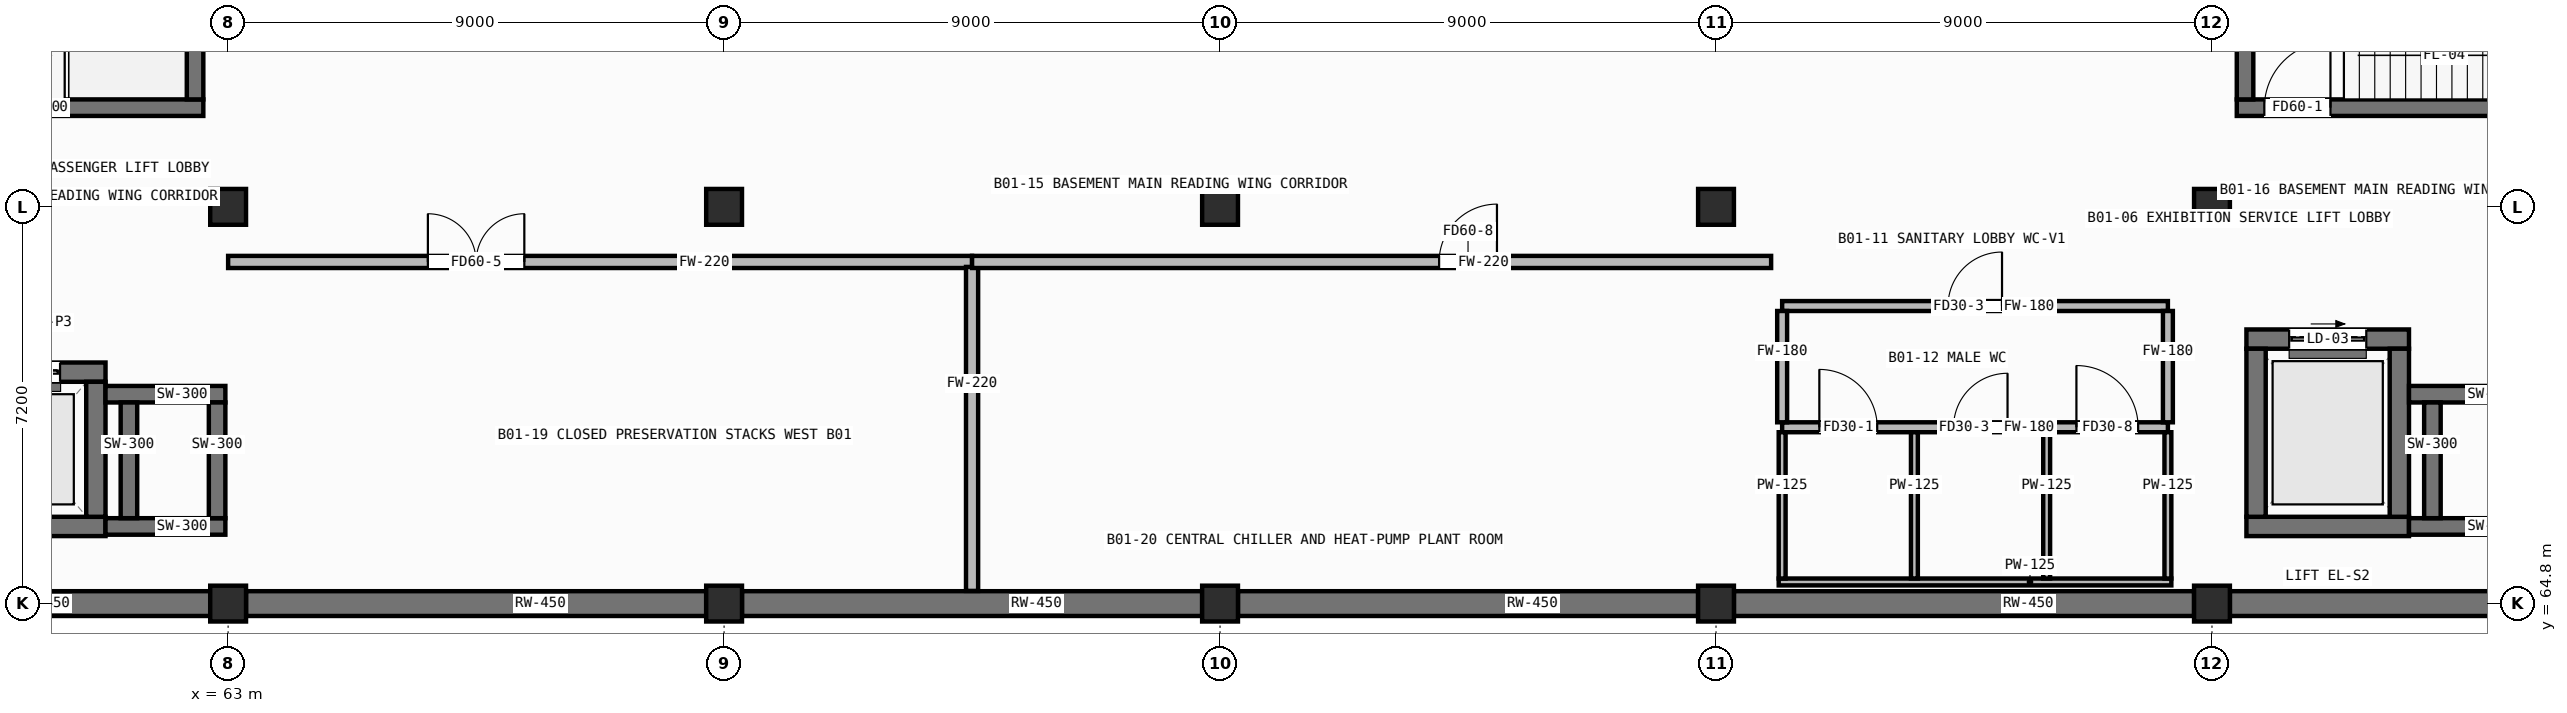
"""IFC4 building model, lengths in metres.
Left out: names, types, materials, properties, quantities, classifications, styles, units other than length and angle.
Written with IfcOpenShell. Run it as: python <this file> out.ifc"""

import sys

from ifc_helpers import new_model, si_unit, direction, frame, frame_2d, origin, origin_2d, place, context, subcontext, project, spatial, rectangle, hollow_rectangle, extrude, element, fill, save


model = new_model("IFC4")
c1 = context("Model", 3, precision=1e-05, world=origin(), true_north=direction((0.0, 1.0)))
c2 = subcontext(c1, "Body", "Model", "MODEL_VIEW")
j1 = project(units=[si_unit("LENGTHUNIT", "METRE"), si_unit("PLANEANGLEUNIT", "RADIAN")], contexts=[c1])
p1 = place(None, origin())
s1 = spatial("IfcSite", under=j1, at=p1, CompositionType="ELEMENT")
p2 = place(p1, origin())
s2 = spatial("IfcBuilding", under=s1, at=p2, CompositionType="ELEMENT")
p3 = place(p2, frame((0.0, 0.0, -4.9)))
s3 = spatial("IfcBuildingStorey", under=s2, at=p3, CompositionType="ELEMENT", Elevation=-4.9)
for number, where, z_axis, x_axis in (
    (1, (63.0, 64.8, 0.0), (0.0, 0.0, 1.0), (1.0, 0.0, 0.0)),
    (2, (63.0, 72.0, 0.0), (0.0, 0.0, 1.0), (1.0, 0.0, 0.0)),
    (3, (72.0, 64.8, 0.0), (0.0, 0.0, 1.0), (1.0, 0.0, 0.0)),
    (4, (72.0, 72.0, 0.0), (0.0, 0.0, 1.0), (1.0, 0.0, 0.0)),
    (5, (81.0, 64.8, 0.0), (0.0, 0.0, 1.0), (1.0, 0.0, 0.0)),
    (6, (81.0, 72.0, 0.0), (0.0, 0.0, 1.0), (1.0, 0.0, 0.0)),
    (7, (90.0, 64.8, 0.0), (0.0, 0.0, 1.0), (1.0, 0.0, 0.0)),
    (8, (90.0, 72.0, 0.0), (0.0, 0.0, 1.0), (1.0, 0.0, 0.0)),
    (9, (99.0, 64.8, 0.0), (0.0, 0.0, 1.0), (1.0, 0.0, 0.0)),
    (10, (99.0, 72.0, 0.0), (0.0, 0.0, 1.0), (1.0, 0.0, 0.0)),
):
    element("IfcColumn", number, at=place(p3, frame(where, z_axis=z_axis, x_axis=x_axis)), inside=s3, PredefinedType="COLUMN", context=c2, shape_type="SweptSolid", body=[
        extrude(hollow_rectangle(XDim=0.65, YDim=0.65, WallThickness=0.025, at=origin_2d()), origin(), (0.0, 0.0, 1.0), 4.9),
    ])
for number, where, z_axis, x_axis in (
    (11, (54.325, 64.8, 0.0), (0.0, 0.0, 1.0), (1.0, 0.0, 0.0)),
    (12, (63.325, 64.8, 0.0), (0.0, 0.0, 1.0), (1.0, 0.0, 0.0)),
    (13, (72.325, 64.8, 0.0), (0.0, 0.0, 1.0), (1.0, 0.0, 0.0)),
    (14, (81.325, 64.8, 0.0), (0.0, 0.0, 1.0), (1.0, 0.0, 0.0)),
    (15, (90.325, 64.8, 0.0), (0.0, 0.0, 1.0), (1.0, 0.0, 0.0)),
):
    element("IfcWall", number, at=place(p3, frame(where, z_axis=z_axis, x_axis=x_axis)), inside=s3, PredefinedType="SOLIDWALL", context=c2, shape_type="SweptSolid", body=[
        extrude(rectangle(XDim=8.35, YDim=0.45, at=frame_2d((4.175, 0.0))), origin(), (0.0, 0.0, 1.0), 4.125),
    ])
p4 = place(p3, frame((99.325, 64.8, 0.0), z_axis=(0.0, 0.0, 1.0), x_axis=(1.0, 0.0, 0.0)))
e16 = element("IfcWall", 16, at=p4, inside=s3, PredefinedType="SOLIDWALL", context=c2, shape_type="SweptSolid", body=[
    extrude(rectangle(XDim=8.425, YDim=0.45, at=frame_2d((4.212, 0.0))), origin(), (0.0, 0.0, 1.0), 3.975),
])
p5 = place(p3, frame((54.45, 73.8, 0.0), z_axis=(0.0, 0.0, 1.0), x_axis=(1.0, 0.0, 0.0)))
e17 = element("IfcWall", 17, at=p5, inside=s3, PredefinedType="SHEAR", context=c2, shape_type="SweptSolid", body=[
    extrude(rectangle(XDim=8.1, YDim=0.3, at=frame_2d((4.05, 0.0))), origin(), (0.0, 0.0, 1.0), 4.625),
])
p6 = place(p5, frame((0.5, 0.0, 0.0)))
e18 = element("IfcOpeningElement", 18, at=p6, cuts=e17, PredefinedType="OPENING", context=c2, shape_type="SweptSolid", body=[
    extrude(rectangle(XDim=1.2, YDim=2.1, at=frame_2d((0.6, 1.05))), frame((0.0, 0.162, 0.0), z_axis=(0.0, -1.0, 0.0), x_axis=(1.0, 0.0, 0.0)), (0.0, 0.0, 1.0), 0.324),
])
p7 = place(p3, frame((62.4, 73.95, 0.0), z_axis=(0.0, 0.0, 1.0), x_axis=(0.0, 1.0, 0.0)))
e19 = element("IfcWall", 19, at=p7, inside=s3, PredefinedType="SHEAR", context=c2, shape_type="SweptSolid", body=[
    extrude(rectangle(XDim=3.8, YDim=0.3, at=frame_2d((1.9, 0.0))), origin(), (0.0, 0.0, 1.0), 4.625),
])
p8 = place(p3, frame((99.45, 73.8, 0.0), z_axis=(0.0, 0.0, 1.0), x_axis=(1.0, 0.0, 0.0)))
e20 = element("IfcWall", 20, at=p8, inside=s3, PredefinedType="SHEAR", context=c2, shape_type="SweptSolid", body=[
    extrude(rectangle(XDim=8.1, YDim=0.3, at=frame_2d((4.05, 0.0))), origin(), (0.0, 0.0, 1.0), 4.625),
])
p9 = place(p8, frame((0.5, 0.0, 0.0)))
e21 = element("IfcOpeningElement", 21, at=p9, cuts=e20, PredefinedType="OPENING", context=c2, shape_type="SweptSolid", body=[
    extrude(rectangle(XDim=1.2, YDim=2.1, at=frame_2d((0.6, 1.05))), frame((0.0, 0.162, 0.0), z_axis=(0.0, -1.0, 0.0), x_axis=(1.0, 0.0, 0.0)), (0.0, 0.0, 1.0), 0.324),
])
p10 = place(p3, frame((99.6, 73.95, 0.0), z_axis=(0.0, 0.0, 1.0), x_axis=(0.0, 1.0, 0.0)))
e22 = element("IfcWall", 22, at=p10, inside=s3, PredefinedType="SHEAR", context=c2, shape_type="SweptSolid", body=[
    extrude(rectangle(XDim=3.8, YDim=0.3, at=frame_2d((1.9, 0.0))), origin(), (0.0, 0.0, 1.0), 4.625),
])
p11 = place(p3, frame((58.025, 66.2, 0.0), z_axis=(0.0, 0.0, 1.0), x_axis=(1.0, 0.0, 0.0)))
e23 = element("IfcWall", 23, at=p11, inside=s3, PredefinedType="SHEAR", context=c2, shape_type="SweptSolid", body=[
    extrude(rectangle(XDim=2.75, YDim=0.35, at=frame_2d((1.375, 0.0))), origin(), (0.0, 0.0, 1.0), 4.625),
])
p12 = place(p3, frame((58.025, 69.0, 0.0), z_axis=(0.0, 0.0, 1.0), x_axis=(1.0, 0.0, 0.0)))
e24 = element("IfcWall", 24, at=p12, inside=s3, PredefinedType="SHEAR", context=c2, shape_type="SweptSolid", body=[
    extrude(rectangle(XDim=2.75, YDim=0.35, at=frame_2d((1.375, 0.0))), origin(), (0.0, 0.0, 1.0), 4.625),
])
p13 = place(p12, frame((0.825, 0.0, 0.0)))
e25 = element("IfcOpeningElement", 25, at=p13, cuts=e24, PredefinedType="OPENING", context=c2, shape_type="SweptSolid", body=[
    extrude(rectangle(XDim=1.1, YDim=2.1, at=frame_2d((0.55, 1.05))), frame((0.0, 0.187, 0.0), z_axis=(0.0, -1.0, 0.0), x_axis=(1.0, 0.0, 0.0)), (0.0, 0.0, 1.0), 0.374),
])
p14 = place(p3, frame((60.6, 66.375, 0.0), z_axis=(0.0, 0.0, 1.0), x_axis=(0.0, 1.0, 0.0)))
e26 = element("IfcWall", 26, at=p14, inside=s3, PredefinedType="SHEAR", context=c2, shape_type="SweptSolid", body=[
    extrude(rectangle(XDim=2.45, YDim=0.35, at=frame_2d((1.225, 0.0))), origin(), (0.0, 0.0, 1.0), 4.625),
])
p15 = place(p3, frame((99.625, 66.2, 0.0), z_axis=(0.0, 0.0, 1.0), x_axis=(1.0, 0.0, 0.0)))
e27 = element("IfcWall", 27, at=p15, inside=s3, PredefinedType="SHEAR", context=c2, shape_type="SweptSolid", body=[
    extrude(rectangle(XDim=2.95, YDim=0.35, at=frame_2d((1.475, 0.0))), origin(), (0.0, 0.0, 1.0), 4.625),
])
p16 = place(p3, frame((99.625, 69.6, 0.0), z_axis=(0.0, 0.0, 1.0), x_axis=(1.0, 0.0, 0.0)))
e28 = element("IfcWall", 28, at=p16, inside=s3, PredefinedType="SHEAR", context=c2, shape_type="SweptSolid", body=[
    extrude(rectangle(XDim=2.95, YDim=0.35, at=frame_2d((1.475, 0.0))), origin(), (0.0, 0.0, 1.0), 4.625),
])
p17 = place(p16, frame((0.775, 0.0, 0.0)))
e29 = element("IfcOpeningElement", 29, at=p17, cuts=e28, PredefinedType="OPENING", context=c2, shape_type="SweptSolid", body=[
    extrude(rectangle(XDim=1.4, YDim=2.15, at=frame_2d((0.7, 1.075))), frame((0.0, 0.187, 0.0), z_axis=(0.0, -1.0, 0.0), x_axis=(1.0, 0.0, 0.0)), (0.0, 0.0, 1.0), 0.374),
])
for number, where, z_axis, x_axis in (
    (30, (99.8, 66.375, 0.0), (0.0, 0.0, 1.0), (0.0, 1.0, 0.0)),
    (31, (102.4, 66.375, 0.0), (0.0, 0.0, 1.0), (0.0, 1.0, 0.0)),
):
    element("IfcWall", number, at=place(p3, frame(where, z_axis=z_axis, x_axis=x_axis)), inside=s3, PredefinedType="SHEAR", context=c2, shape_type="SweptSolid", body=[
        extrude(rectangle(XDim=3.05, YDim=0.35, at=frame_2d((1.525, 0.0))), origin(), (0.0, 0.0, 1.0), 4.625),
    ])
for number, where, z_axis, x_axis in (
    (32, (60.775, 66.2, 0.0), (0.0, 0.0, 1.0), (1.0, 0.0, 0.0)),
    (33, (60.775, 68.6, 0.0), (0.0, 0.0, 1.0), (1.0, 0.0, 0.0)),
):
    element("IfcWall", number, at=place(p3, frame(where, z_axis=z_axis, x_axis=x_axis)), inside=s3, PredefinedType="SHEAR", context=c2, shape_type="SweptSolid", body=[
        extrude(rectangle(XDim=2.175, YDim=0.3, at=frame_2d((1.087, 0.0))), origin(), (0.0, 0.0, 1.0), 4.625),
    ])
for number, where, z_axis, x_axis in (
    (34, (61.2, 66.35, 0.0), (0.0, 0.0, 1.0), (0.0, 1.0, 0.0)),
    (35, (62.8, 66.35, 0.0), (0.0, 0.0, 1.0), (0.0, 1.0, 0.0)),
):
    element("IfcWall", number, at=place(p3, frame(where, z_axis=z_axis, x_axis=x_axis)), inside=s3, PredefinedType="SHEAR", context=c2, shape_type="SweptSolid", body=[
        extrude(rectangle(XDim=2.1, YDim=0.3, at=frame_2d((1.05, 0.0))), origin(), (0.0, 0.0, 1.0), 4.625),
    ])
for number, where, z_axis, x_axis in (
    (36, (102.575, 66.2, 0.0), (0.0, 0.0, 1.0), (1.0, 0.0, 0.0)),
    (37, (102.575, 68.6, 0.0), (0.0, 0.0, 1.0), (1.0, 0.0, 0.0)),
):
    element("IfcWall", number, at=place(p3, frame(where, z_axis=z_axis, x_axis=x_axis)), inside=s3, PredefinedType="SHEAR", context=c2, shape_type="SweptSolid", body=[
        extrude(rectangle(XDim=2.375, YDim=0.3, at=frame_2d((1.188, 0.0))), origin(), (0.0, 0.0, 1.0), 4.625),
    ])
p18 = place(p3, frame((103.0, 66.35, 0.0), z_axis=(0.0, 0.0, 1.0), x_axis=(0.0, 1.0, 0.0)))
e38 = element("IfcWall", 38, at=p18, inside=s3, PredefinedType="SHEAR", context=c2, shape_type="SweptSolid", body=[
    extrude(rectangle(XDim=2.1, YDim=0.3, at=frame_2d((1.05, 0.0))), origin(), (0.0, 0.0, 1.0), 4.625),
])
p19 = place(p3, frame((91.137, 65.192, 0.0), z_axis=(0.0, 0.0, 1.0), x_axis=(1.0, 0.0, 0.0)))
e39 = element("IfcWall", 39, at=p19, inside=s3, PredefinedType="PARTITIONING", context=c2, shape_type="SweptSolid", body=[
    extrude(rectangle(XDim=7.125, YDim=0.125, at=frame_2d((3.562, 0.0))), origin(), (0.0, 0.0, 1.0), 4.625),
])
p20 = place(p3, frame((91.2, 68.0, 0.0), z_axis=(0.0, 0.0, 1.0), x_axis=(1.0, 0.0, 0.0)))
e40 = element("IfcWall", 40, at=p20, inside=s3, PredefinedType="PARTITIONING", context=c2, shape_type="SweptSolid", body=[
    extrude(rectangle(XDim=7.0, YDim=0.18, at=frame_2d((3.5, 0.0))), origin(), (0.0, 0.0, 1.0), 4.625),
])
p21 = place(p20, frame((0.675, 0.0, 0.0)))
e41 = element("IfcOpeningElement", 41, at=p21, cuts=e40, PredefinedType="OPENING", context=c2, shape_type="SweptSolid", body=[
    extrude(rectangle(XDim=1.05, YDim=2.1, at=frame_2d((0.525, 1.05))), frame((0.0, 0.102, 0.0), z_axis=(0.0, -1.0, 0.0), x_axis=(1.0, 0.0, 0.0)), (0.0, 0.0, 1.0), 0.204),
])
p22 = place(p20, frame((3.11, 0.0, 0.0)))
e42 = element("IfcOpeningElement", 42, at=p22, cuts=e40, PredefinedType="OPENING", context=c2, shape_type="SweptSolid", body=[
    extrude(rectangle(XDim=0.98, YDim=2.02, at=frame_2d((0.49, 1.01))), frame((0.0, 0.102, 0.0), z_axis=(0.0, -1.0, 0.0), x_axis=(1.0, 0.0, 0.0)), (0.0, 0.0, 1.0), 0.204),
])
p23 = place(p20, frame((5.34, 0.0, 0.0)))
e43 = element("IfcOpeningElement", 43, at=p23, cuts=e40, PredefinedType="OPENING", context=c2, shape_type="SweptSolid", body=[
    extrude(rectangle(XDim=1.12, YDim=2.08, at=frame_2d((0.56, 1.04))), frame((0.0, 0.102, 0.0), z_axis=(0.0, -1.0, 0.0), x_axis=(1.0, 0.0, 0.0)), (0.0, 0.0, 1.0), 0.204),
])
p24 = place(p3, frame((91.2, 70.2, 0.0), z_axis=(0.0, 0.0, 1.0), x_axis=(1.0, 0.0, 0.0)))
e44 = element("IfcWall", 44, at=p24, inside=s3, PredefinedType="PARTITIONING", context=c2, shape_type="SweptSolid", body=[
    extrude(rectangle(XDim=7.0, YDim=0.18, at=frame_2d((3.5, 0.0))), origin(), (0.0, 0.0, 1.0), 4.625),
])
p25 = place(p24, frame((3.01, 0.0, 0.0)))
e45 = element("IfcOpeningElement", 45, at=p25, cuts=e44, PredefinedType="OPENING", context=c2, shape_type="SweptSolid", body=[
    extrude(rectangle(XDim=0.98, YDim=2.02, at=frame_2d((0.49, 1.01))), frame((0.0, 0.102, 0.0), z_axis=(0.0, -1.0, 0.0), x_axis=(1.0, 0.0, 0.0)), (0.0, 0.0, 1.0), 0.204),
])
for number, where, z_axis, x_axis in (
    (46, (91.2, 68.09, 0.0), (0.0, 0.0, 1.0), (0.0, 1.0, 0.0)),
    (47, (98.2, 68.09, 0.0), (0.0, 0.0, 1.0), (0.0, 1.0, 0.0)),
):
    element("IfcWall", number, at=place(p3, frame(where, z_axis=z_axis, x_axis=x_axis)), inside=s3, PredefinedType="PARTITIONING", context=c2, shape_type="SweptSolid", body=[
        extrude(rectangle(XDim=2.02, YDim=0.18, at=frame_2d((1.01, 0.0))), origin(), (0.0, 0.0, 1.0), 4.625),
    ])
for number, where, z_axis, x_axis in (
    (48, (91.2, 65.255, 0.0), (0.0, 0.0, 1.0), (0.0, 1.0, 0.0)),
    (49, (93.6, 65.255, 0.0), (0.0, 0.0, 1.0), (0.0, 1.0, 0.0)),
    (50, (96.0, 65.255, 0.0), (0.0, 0.0, 1.0), (0.0, 1.0, 0.0)),
    (51, (98.2, 65.255, 0.0), (0.0, 0.0, 1.0), (0.0, 1.0, 0.0)),
):
    element("IfcWall", number, at=place(p3, frame(where, z_axis=z_axis, x_axis=x_axis)), inside=s3, PredefinedType="PARTITIONING", context=c2, shape_type="SweptSolid", body=[
        extrude(rectangle(XDim=2.655, YDim=0.125, at=frame_2d((1.328, 0.0))), origin(), (0.0, 0.0, 1.0), 4.625),
    ])
p26 = place(p3, frame((63.0, 71.0, 0.0), z_axis=(0.0, 0.0, 1.0), x_axis=(1.0, 0.0, 0.0)))
e52 = element("IfcWall", 52, at=p26, inside=s3, PredefinedType="PARTITIONING", context=c2, shape_type="SweptSolid", body=[
    extrude(rectangle(XDim=13.5, YDim=0.22, at=frame_2d((6.75, 0.0))), origin(), (0.0, 0.0, 1.0), 4.625),
])
p27 = place(p26, frame((3.625, 0.0, 0.0)))
e53 = element("IfcOpeningElement", 53, at=p27, cuts=e52, PredefinedType="OPENING", context=c2, shape_type="SweptSolid", body=[
    extrude(rectangle(XDim=1.75, YDim=2.12, at=frame_2d((0.875, 1.06))), frame((0.0, 0.122, 0.0), z_axis=(0.0, -1.0, 0.0), x_axis=(1.0, 0.0, 0.0)), (0.0, 0.0, 1.0), 0.244),
])
p28 = place(p3, frame((76.5, 65.03, 0.0), z_axis=(0.0, 0.0, 1.0), x_axis=(0.0, 1.0, 0.0)))
e54 = element("IfcWall", 54, at=p28, inside=s3, PredefinedType="PARTITIONING", context=c2, shape_type="SweptSolid", body=[
    extrude(rectangle(XDim=5.88, YDim=0.22, at=frame_2d((2.94, 0.0))), origin(), (0.0, 0.0, 1.0), 4.625),
])
p29 = place(p3, frame((76.5, 71.0, 0.0), z_axis=(0.0, 0.0, 1.0), x_axis=(1.0, 0.0, 0.0)))
e55 = element("IfcWall", 55, at=p29, inside=s3, PredefinedType="PARTITIONING", context=c2, shape_type="SweptSolid", body=[
    extrude(rectangle(XDim=14.5, YDim=0.22, at=frame_2d((7.25, 0.0))), origin(), (0.0, 0.0, 1.0), 4.625),
])
p30 = place(p29, frame((8.475, 0.0, 0.0)))
e56 = element("IfcOpeningElement", 56, at=p30, cuts=e55, PredefinedType="OPENING", context=c2, shape_type="SweptSolid", body=[
    extrude(rectangle(XDim=1.05, YDim=2.02, at=frame_2d((0.525, 1.01))), frame((0.0, 0.122, 0.0), z_axis=(0.0, -1.0, 0.0), x_axis=(1.0, 0.0, 0.0)), (0.0, 0.0, 1.0), 0.244),
])
p31 = place(p9, origin())
e57 = element("IfcDoor", 57, at=p31, inside=s3, OperationType="SINGLE_SWING_RIGHT", PredefinedType="DOOR", context=c2, shape_type="SweptSolid", body=[
    extrude(rectangle(XDim=1.2, YDim=2.1, at=frame_2d((0.6, 1.05))), frame((0.0, 0.025, 0.0), z_axis=(0.0, -1.0, 0.0), x_axis=(1.0, 0.0, 0.0)), (0.0, 0.0, 1.0), 0.05),
])
fill(e21, e57)
p32 = place(p13, origin())
e58 = element("IfcDoor", 58, at=p32, inside=s3, OperationType="SLIDING_TO_RIGHT", PredefinedType="DOOR", context=c2, shape_type="SweptSolid", body=[
    extrude(rectangle(XDim=1.1, YDim=2.1, at=frame_2d((0.55, 1.05))), frame((0.0, 0.025, 0.0), z_axis=(0.0, -1.0, 0.0), x_axis=(1.0, 0.0, 0.0)), (0.0, 0.0, 1.0), 0.05),
])
fill(e25, e58)
p33 = place(p17, origin())
e59 = element("IfcDoor", 59, at=p33, inside=s3, OperationType="SLIDING_TO_RIGHT", PredefinedType="DOOR", context=c2, shape_type="SweptSolid", body=[
    extrude(rectangle(XDim=1.4, YDim=2.15, at=frame_2d((0.7, 1.075))), frame((0.0, 0.025, 0.0), z_axis=(0.0, -1.0, 0.0), x_axis=(1.0, 0.0, 0.0)), (0.0, 0.0, 1.0), 0.05),
])
fill(e29, e59)
p34 = place(p25, origin())
e60 = element("IfcDoor", 60, at=p34, inside=s3, OperationType="SINGLE_SWING_RIGHT", PredefinedType="DOOR", context=c2, shape_type="SweptSolid", body=[
    extrude(rectangle(XDim=0.98, YDim=2.02, at=frame_2d((0.49, 1.01))), frame((0.0, 0.025, 0.0), z_axis=(0.0, -1.0, 0.0), x_axis=(1.0, 0.0, 0.0)), (0.0, 0.0, 1.0), 0.05),
])
fill(e45, e60)
p35 = place(p21, origin())
e61 = element("IfcDoor", 61, at=p35, inside=s3, OperationType="SINGLE_SWING_LEFT", PredefinedType="DOOR", context=c2, shape_type="SweptSolid", body=[
    extrude(rectangle(XDim=1.05, YDim=2.1, at=frame_2d((0.525, 1.05))), frame((0.0, 0.025, 0.0), z_axis=(0.0, -1.0, 0.0), x_axis=(1.0, 0.0, 0.0)), (0.0, 0.0, 1.0), 0.05),
])
fill(e41, e61)
p36 = place(p22, origin())
e62 = element("IfcDoor", 62, at=p36, inside=s3, OperationType="SINGLE_SWING_RIGHT", PredefinedType="DOOR", context=c2, shape_type="SweptSolid", body=[
    extrude(rectangle(XDim=0.98, YDim=2.02, at=frame_2d((0.49, 1.01))), frame((0.0, 0.025, 0.0), z_axis=(0.0, -1.0, 0.0), x_axis=(1.0, 0.0, 0.0)), (0.0, 0.0, 1.0), 0.05),
])
fill(e42, e62)
p37 = place(p23, origin())
e63 = element("IfcDoor", 63, at=p37, inside=s3, OperationType="SINGLE_SWING_LEFT", PredefinedType="DOOR", context=c2, shape_type="SweptSolid", body=[
    extrude(rectangle(XDim=1.12, YDim=2.08, at=frame_2d((0.56, 1.04))), frame((0.0, 0.025, 0.0), z_axis=(0.0, -1.0, 0.0), x_axis=(1.0, 0.0, 0.0)), (0.0, 0.0, 1.0), 0.05),
])
fill(e43, e63)
p38 = place(p27, origin())
e64 = element("IfcDoor", 64, at=p38, inside=s3, OperationType="DOUBLE_DOOR_SINGLE_SWING", PredefinedType="DOOR", context=c2, shape_type="SweptSolid", body=[
    extrude(rectangle(XDim=1.75, YDim=2.12, at=frame_2d((0.875, 1.06))), frame((0.0, 0.025, 0.0), z_axis=(0.0, -1.0, 0.0), x_axis=(1.0, 0.0, 0.0)), (0.0, 0.0, 1.0), 0.05),
])
fill(e53, e64)
p39 = place(p30, origin())
e65 = element("IfcDoor", 65, at=p39, inside=s3, OperationType="SINGLE_SWING_RIGHT", PredefinedType="DOOR", context=c2, shape_type="SweptSolid", body=[
    extrude(rectangle(XDim=1.05, YDim=2.02, at=frame_2d((0.525, 1.01))), frame((0.0, 0.025, 0.0), z_axis=(0.0, -1.0, 0.0), x_axis=(1.0, 0.0, 0.0)), (0.0, 0.0, 1.0), 0.05),
])
fill(e56, e65)
save(model, sys.argv[1])
